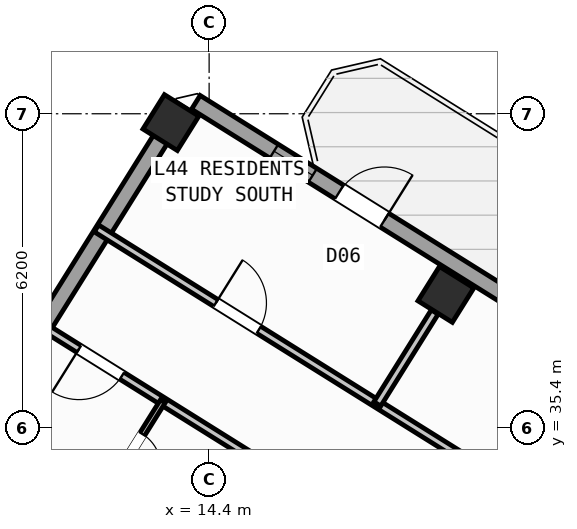
"""IFC4 building model, lengths in metres.
Left out: names, types, materials, properties, quantities, classifications, styles, units other than length and angle.
Written with IfcOpenShell. Run it as: python <this file> out.ifc"""

import sys

from ifc_helpers import new_model, si_unit, direction, frame, frame_2d, origin, origin_2d, place, context, subcontext, project, spatial, rectangle, hollow_rectangle, extrude, source, transform, mapped, element, fill, save


model = new_model("IFC4")
c1 = context("Model", 3, precision=1e-05, world=origin(), true_north=direction((0.0, 1.0)))
c2 = subcontext(c1, "Body", "Model", "MODEL_VIEW")
j1 = project(units=[si_unit("LENGTHUNIT", "METRE"), si_unit("PLANEANGLEUNIT", "RADIAN")], contexts=[c1])
p1 = place(None, origin())
s1 = spatial("IfcSite", under=j1, at=p1, CompositionType="ELEMENT")
p2 = place(p1, origin())
s2 = spatial("IfcBuilding", under=s1, at=p2, CompositionType="ELEMENT")
p3 = place(p2, frame((0.0, 0.0, 174.9)))
s3 = spatial("IfcBuildingStorey", under=s2, at=p3, CompositionType="ELEMENT", Elevation=174.9)
m1 = source(origin(), c2, "Body", "SweptSolid", [
    extrude(hollow_rectangle(XDim=0.8, YDim=0.8, WallThickness=0.032, at=origin_2d()), origin(), (0.0, 0.0, 1.0), 4.5),
])
for number, where, z_axis, x_axis in (
    (1, (19.073, 38.034, 0.0), (0.0, 0.0, 1.0), (-0.848, 0.53, 0.0)),
    (2, (13.646, 41.426, 0.0), (0.0, 0.0, 1.0), (-0.848, 0.53, 0.0)),
):
    element("IfcColumn", number, at=place(p3, frame(where, z_axis=z_axis, x_axis=x_axis)), inside=s3, PredefinedType="COLUMN", context=c2, shape_type="MappedRepresentation", body=[
        mapped(m1, transform((0.0, 0.0, 0.0), scale=1.0)),
    ])
p4 = place(p3, frame((2.415, 23.452, 0.0), z_axis=(0.0, 0.0, 1.0), x_axis=(0.52991049553, 0.848053575387, 0.0)))
e3 = element("IfcWall", 3, at=p4, inside=s3, PredefinedType="STANDARD", context=c2, shape_type="SweptSolid", body=[
    extrude(rectangle(XDim=21.587, YDim=0.32, at=frame_2d((10.794, 0.0))), origin(), (0.0, 0.0, 1.0), 2.395),
])
p5 = place(p4, frame((3.469, 0.0, 1.0)))
e4 = element("IfcOpeningElement", 4, at=p5, cuts=e3, PredefinedType="OPENING", context=c2, shape_type="SweptSolid", body=[
    extrude(rectangle(XDim=0.9, YDim=1.25, at=frame_2d((0.45, 0.625))), frame((0.0, 0.17, 0.0), z_axis=(0.0, -1.0, 0.0), x_axis=(1.0, 0.0, 0.0)), (0.0, 0.0, 1.0), 0.34),
])
p6 = place(p4, frame((8.344, 0.0, 1.0)))
e5 = element("IfcOpeningElement", 5, at=p6, cuts=e3, PredefinedType="OPENING", context=c2, shape_type="SweptSolid", body=[
    extrude(rectangle(XDim=0.9, YDim=1.25, at=frame_2d((0.45, 0.625))), frame((0.0, 0.17, 0.0), z_axis=(0.0, -1.0, 0.0), x_axis=(1.0, 0.0, 0.0)), (0.0, 0.0, 1.0), 0.34),
])
p7 = place(p4, frame((11.244, 0.0, 1.0)))
e6 = element("IfcOpeningElement", 6, at=p7, cuts=e3, PredefinedType="OPENING", context=c2, shape_type="SweptSolid", body=[
    extrude(rectangle(XDim=0.9, YDim=1.25, at=frame_2d((0.45, 0.625))), frame((0.0, 0.17, 0.0), z_axis=(0.0, -1.0, 0.0), x_axis=(1.0, 0.0, 0.0)), (0.0, 0.0, 1.0), 0.34),
])
p8 = place(p4, frame((14.829, 0.0, 1.0)))
e7 = element("IfcOpeningElement", 7, at=p8, cuts=e3, PredefinedType="OPENING", context=c2, shape_type="SweptSolid", body=[
    extrude(rectangle(XDim=0.9, YDim=1.25, at=frame_2d((0.45, 0.625))), frame((0.0, 0.17, 0.0), z_axis=(0.0, -1.0, 0.0), x_axis=(1.0, 0.0, 0.0)), (0.0, 0.0, 1.0), 0.34),
])
p9 = place(p3, frame((14.138, 41.825, 0.0), z_axis=(0.0, 0.0, 1.0), x_axis=(0.848046498049, -0.529921821731, 0.0)))
e8 = element("IfcWall", 8, at=p9, inside=s3, PredefinedType="STANDARD", context=c2, shape_type="SweptSolid", body=[
    extrude(rectangle(XDim=31.588, YDim=0.32, at=frame_2d((15.794, 0.0))), origin(), (0.0, 0.0, 1.0), 4.22),
])
p10 = place(p9, frame((3.339, 0.0, 0.0)))
e9 = element("IfcOpeningElement", 9, at=p10, cuts=e8, PredefinedType="OPENING", context=c2, shape_type="SweptSolid", body=[
    extrude(rectangle(XDim=1.05, YDim=2.15, at=frame_2d((0.525, 1.075))), frame((0.0, 0.17, 0.0), z_axis=(0.0, -1.0, 0.0), x_axis=(1.0, 0.0, 0.0)), (0.0, 0.0, 1.0), 0.34),
])
p11 = place(p9, frame((1.819, 0.0, 1.0)))
e10 = element("IfcOpeningElement", 10, at=p11, cuts=e8, PredefinedType="OPENING", context=c2, shape_type="SweptSolid", body=[
    extrude(rectangle(XDim=0.9, YDim=1.25, at=frame_2d((0.45, 0.625))), frame((0.0, 0.17, 0.0), z_axis=(0.0, -1.0, 0.0), x_axis=(1.0, 0.0, 0.0)), (0.0, 0.0, 1.0), 0.34),
])
p12 = place(p9, frame((8.494, 0.0, 0.85)))
e11 = element("IfcOpeningElement", 11, at=p12, cuts=e8, PredefinedType="OPENING", context=c2, shape_type="SweptSolid", body=[
    extrude(rectangle(XDim=1.8, YDim=1.5, at=frame_2d((0.9, 0.75))), frame((0.0, 0.17, 0.0), z_axis=(0.0, -1.0, 0.0), x_axis=(1.0, 0.0, 0.0)), (0.0, 0.0, 1.0), 0.34),
])
p13 = place(p9, frame((14.636, 0.0, 1.0)))
e12 = element("IfcOpeningElement", 12, at=p13, cuts=e8, PredefinedType="OPENING", context=c2, shape_type="SweptSolid", body=[
    extrude(rectangle(XDim=0.9, YDim=1.25, at=frame_2d((0.45, 0.625))), frame((0.0, 0.17, 0.0), z_axis=(0.0, -1.0, 0.0), x_axis=(1.0, 0.0, 0.0)), (0.0, 0.0, 1.0), 0.34),
])
p14 = place(p9, frame((22.456, 0.0, 0.95)))
e13 = element("IfcOpeningElement", 13, at=p14, cuts=e8, PredefinedType="OPENING", context=c2, shape_type="SweptSolid", body=[
    extrude(rectangle(XDim=1.2, YDim=1.4, at=frame_2d((0.6, 0.7))), frame((0.0, 0.17, 0.0), z_axis=(0.0, -1.0, 0.0), x_axis=(1.0, 0.0, 0.0)), (0.0, 0.0, 1.0), 0.34),
])
p15 = place(p9, frame((27.131, 0.0, 0.95)))
e14 = element("IfcOpeningElement", 14, at=p15, cuts=e8, PredefinedType="OPENING", context=c2, shape_type="SweptSolid", body=[
    extrude(rectangle(XDim=1.2, YDim=1.4, at=frame_2d((0.6, 0.7))), frame((0.0, 0.17, 0.0), z_axis=(0.0, -1.0, 0.0), x_axis=(1.0, 0.0, 0.0)), (0.0, 0.0, 1.0), 0.34),
])
p16 = place(p3, frame((26.363, 30.472, 0.0), z_axis=(0.0, 0.0, 1.0), x_axis=(-0.848052408131, 0.529912363569, 0.0)))
e15 = element("IfcWall", 15, at=p16, inside=s3, PredefinedType="PARTITIONING", context=c2, shape_type="SweptSolid", body=[
    extrude(rectangle(XDim=16.73, YDim=0.16, at=frame_2d((8.365, 0.0))), origin(), (0.0, 0.0, 1.0), 4.21),
])
p17 = place(p16, frame((1.588, 0.0, 0.0)))
e16 = element("IfcOpeningElement", 16, at=p17, cuts=e15, PredefinedType="OPENING", context=c2, shape_type="SweptSolid", body=[
    extrude(rectangle(XDim=1.0, YDim=2.1, at=frame_2d((0.5, 1.05))), frame((0.0, 0.09, 0.0), z_axis=(0.0, -1.0, 0.0), x_axis=(1.0, 0.0, 0.0)), (0.0, 0.0, 1.0), 0.18),
])
p18 = place(p16, frame((6.685, 0.0, 0.0)))
e17 = element("IfcOpeningElement", 17, at=p18, cuts=e15, PredefinedType="OPENING", context=c2, shape_type="SweptSolid", body=[
    extrude(rectangle(XDim=1.0, YDim=2.1, at=frame_2d((0.5, 1.05))), frame((0.0, 0.09, 0.0), z_axis=(0.0, -1.0, 0.0), x_axis=(1.0, 0.0, 0.0)), (0.0, 0.0, 1.0), 0.18),
])
p19 = place(p16, frame((12.951, 0.0, 0.0)))
e18 = element("IfcOpeningElement", 18, at=p19, cuts=e15, PredefinedType="OPENING", context=c2, shape_type="SweptSolid", body=[
    extrude(rectangle(XDim=1.0, YDim=2.1, at=frame_2d((0.5, 1.05))), frame((0.0, 0.09, 0.0), z_axis=(0.0, -1.0, 0.0), x_axis=(1.0, 0.0, 0.0)), (0.0, 0.0, 1.0), 0.18),
])
p20 = place(p3, frame((25.198, 28.606, 0.0), z_axis=(0.0, 0.0, 1.0), x_axis=(-0.848052408131, 0.529912363569, 0.0)))
e19 = element("IfcWall", 19, at=p20, inside=s3, PredefinedType="PARTITIONING", context=c2, shape_type="SweptSolid", body=[
    extrude(rectangle(XDim=16.73, YDim=0.16, at=frame_2d((8.365, 0.0))), origin(), (0.0, 0.0, 1.0), 4.21),
])
p21 = place(p20, frame((1.395, 0.0, 0.0)))
e20 = element("IfcOpeningElement", 20, at=p21, cuts=e19, PredefinedType="OPENING", context=c2, shape_type="SweptSolid", body=[
    extrude(rectangle(XDim=1.0, YDim=2.1, at=frame_2d((0.5, 1.05))), frame((0.0, 0.09, 0.0), z_axis=(0.0, -1.0, 0.0), x_axis=(1.0, 0.0, 0.0)), (0.0, 0.0, 1.0), 0.18),
])
p22 = place(p20, frame((7.82, 0.0, 0.0)))
e21 = element("IfcOpeningElement", 21, at=p22, cuts=e19, PredefinedType="OPENING", context=c2, shape_type="SweptSolid", body=[
    extrude(rectangle(XDim=1.0, YDim=2.1, at=frame_2d((0.5, 1.05))), frame((0.0, 0.09, 0.0), z_axis=(0.0, -1.0, 0.0), x_axis=(1.0, 0.0, 0.0)), (0.0, 0.0, 1.0), 0.18),
])
p23 = place(p20, frame((14.76, 0.0, 0.0)))
e22 = element("IfcOpeningElement", 22, at=p23, cuts=e19, PredefinedType="OPENING", context=c2, shape_type="SweptSolid", body=[
    extrude(rectangle(XDim=1.0, YDim=2.1, at=frame_2d((0.5, 1.05))), frame((0.0, 0.09, 0.0), z_axis=(0.0, -1.0, 0.0), x_axis=(1.0, 0.0, 0.0)), (0.0, 0.0, 1.0), 0.18),
])
p24 = place(p3, frame((13.486, 35.924, 0.0), z_axis=(0.0, 0.0, 1.0), x_axis=(-0.529920421309, -0.848047373134, 0.0)))
e23 = element("IfcWall", 23, at=p24, inside=s3, PredefinedType="PARTITIONING", context=c2, shape_type="SweptSolid", body=[
    extrude(rectangle(XDim=16.77, YDim=0.11, at=frame_2d((8.385, 0.0))), origin(), (0.0, 0.0, 1.0), 4.21),
])
p25 = place(p24, frame((0.76, 0.0, 0.0)))
e24 = element("IfcOpeningElement", 24, at=p25, cuts=e23, PredefinedType="OPENING", context=c2, shape_type="SweptSolid", body=[
    extrude(rectangle(XDim=0.78, YDim=2.05, at=frame_2d((0.39, 1.025))), frame((0.0, 0.065, 0.0), z_axis=(0.0, -1.0, 0.0), x_axis=(1.0, 0.0, 0.0)), (0.0, 0.0, 1.0), 0.13),
])
p26 = place(p24, frame((5.967, 0.0, 0.0)))
e25 = element("IfcOpeningElement", 25, at=p26, cuts=e23, PredefinedType="OPENING", context=c2, shape_type="SweptSolid", body=[
    extrude(rectangle(XDim=0.92, YDim=2.08, at=frame_2d((0.46, 1.04))), frame((0.0, 0.065, 0.0), z_axis=(0.0, -1.0, 0.0), x_axis=(1.0, 0.0, 0.0)), (0.0, 0.0, 1.0), 0.13),
])
p27 = place(p3, frame((12.214, 33.889, 0.0), z_axis=(0.0, 0.0, 1.0), x_axis=(-0.848056217259, 0.529906267531, 0.0)))
e26 = element("IfcWall", 26, at=p27, inside=s3, PredefinedType="PLUMBINGWALL", context=c2, shape_type="SweptSolid", body=[
    extrude(rectangle(XDim=2.368, YDim=0.14, at=frame_2d((1.184, 0.0))), origin(), (0.0, 0.0, 1.0), 3.695),
])
p28 = place(p27, frame((0.99, 0.0, 0.0)))
e27 = element("IfcOpeningElement", 27, at=p28, cuts=e26, PredefinedType="OPENING", context=c2, shape_type="SweptSolid", body=[
    extrude(rectangle(XDim=0.92, YDim=2.08, at=frame_2d((0.46, 1.04))), frame((0.0, 0.08, 0.0), z_axis=(0.0, -1.0, 0.0), x_axis=(1.0, 0.0, 0.0)), (0.0, 0.0, 1.0), 0.16),
])
p29 = place(p3, frame((18.852, 37.687, 0.0), z_axis=(0.0, 0.0, 1.0), x_axis=(-0.529927092104, -0.84804320471, 0.0)))
e28 = element("IfcWall", 28, at=p29, inside=s3, PredefinedType="PARTITIONING", context=c2, shape_type="SweptSolid", body=[
    extrude(rectangle(XDim=2.138, YDim=0.16, at=frame_2d((1.069, 0.0))), origin(), (0.0, 0.0, 1.0), 2.395),
])
m2 = source(origin(), c2, "Body", "SweptSolid", [
    extrude(rectangle(XDim=1.05, YDim=2.15, at=frame_2d((0.525, 1.075))), frame((0.0, 0.025, 0.0), z_axis=(0.0, -1.0, 0.0), x_axis=(1.0, 0.0, 0.0)), (0.0, 0.0, 1.0), 0.05),
])
p30 = place(p10, origin())
e29 = element("IfcDoor", 29, at=p30, inside=s3, OperationType="SINGLE_SWING_RIGHT", PredefinedType="DOOR", context=c2, shape_type="MappedRepresentation", body=[
    mapped(m2, transform((0.0, 0.0, 0.0), scale=1.0)),
])
fill(e9, e29)
m3 = source(origin(), c2, "Body", "SweptSolid", [
    extrude(rectangle(XDim=0.9, YDim=1.25, at=frame_2d((0.45, 0.625))), frame((0.0, 0.03, 0.0), z_axis=(0.0, -1.0, 0.0), x_axis=(1.0, 0.0, 0.0)), (0.0, 0.0, 1.0), 0.06),
])
p31 = place(p11, origin())
e30 = element("IfcWindow", 30, at=p31, inside=s3, PartitioningType="SINGLE_PANEL", PredefinedType="WINDOW", context=c2, shape_type="MappedRepresentation", body=[
    mapped(m3, transform((0.0, 0.0, 0.0), scale=1.0)),
])
fill(e10, e30)
m4 = source(origin(), c2, "Body", "SweptSolid", [
    extrude(rectangle(XDim=1.0, YDim=2.1, at=frame_2d((0.5, 1.05))), frame((0.0, 0.025, 0.0), z_axis=(0.0, -1.0, 0.0), x_axis=(1.0, 0.0, 0.0)), (0.0, 0.0, 1.0), 0.05),
])
p32 = place(p23, origin())
e31 = element("IfcDoor", 31, at=p32, inside=s3, OperationType="SINGLE_SWING_RIGHT", PredefinedType="DOOR", context=c2, shape_type="MappedRepresentation", body=[
    mapped(m4, transform((0.0, 0.0, 0.0), scale=1.0)),
])
fill(e22, e31)
m5 = source(origin(), c2, "Body", "SweptSolid", [
    extrude(rectangle(XDim=0.78, YDim=2.05, at=frame_2d((0.39, 1.025))), frame((0.0, 0.025, 0.0), z_axis=(0.0, -1.0, 0.0), x_axis=(1.0, 0.0, 0.0)), (0.0, 0.0, 1.0), 0.05),
])
p33 = place(p25, origin())
e32 = element("IfcDoor", 32, at=p33, inside=s3, OperationType="SINGLE_SWING_RIGHT", PredefinedType="DOOR", context=c2, shape_type="MappedRepresentation", body=[
    mapped(m5, transform((0.0, 0.0, 0.0), scale=1.0)),
])
fill(e24, e32)
p34 = place(p19, frame((1.0, 0.0, 0.0), z_axis=(0.0, 0.0, 1.0), x_axis=(-1.0, 0.0, 0.0)))
e33 = element("IfcDoor", 33, at=p34, inside=s3, OperationType="SINGLE_SWING_LEFT", PredefinedType="DOOR", context=c2, shape_type="MappedRepresentation", body=[
    mapped(m4, transform((0.0, 0.0, 0.0), scale=1.0)),
])
fill(e18, e33)
save(model, sys.argv[1])
